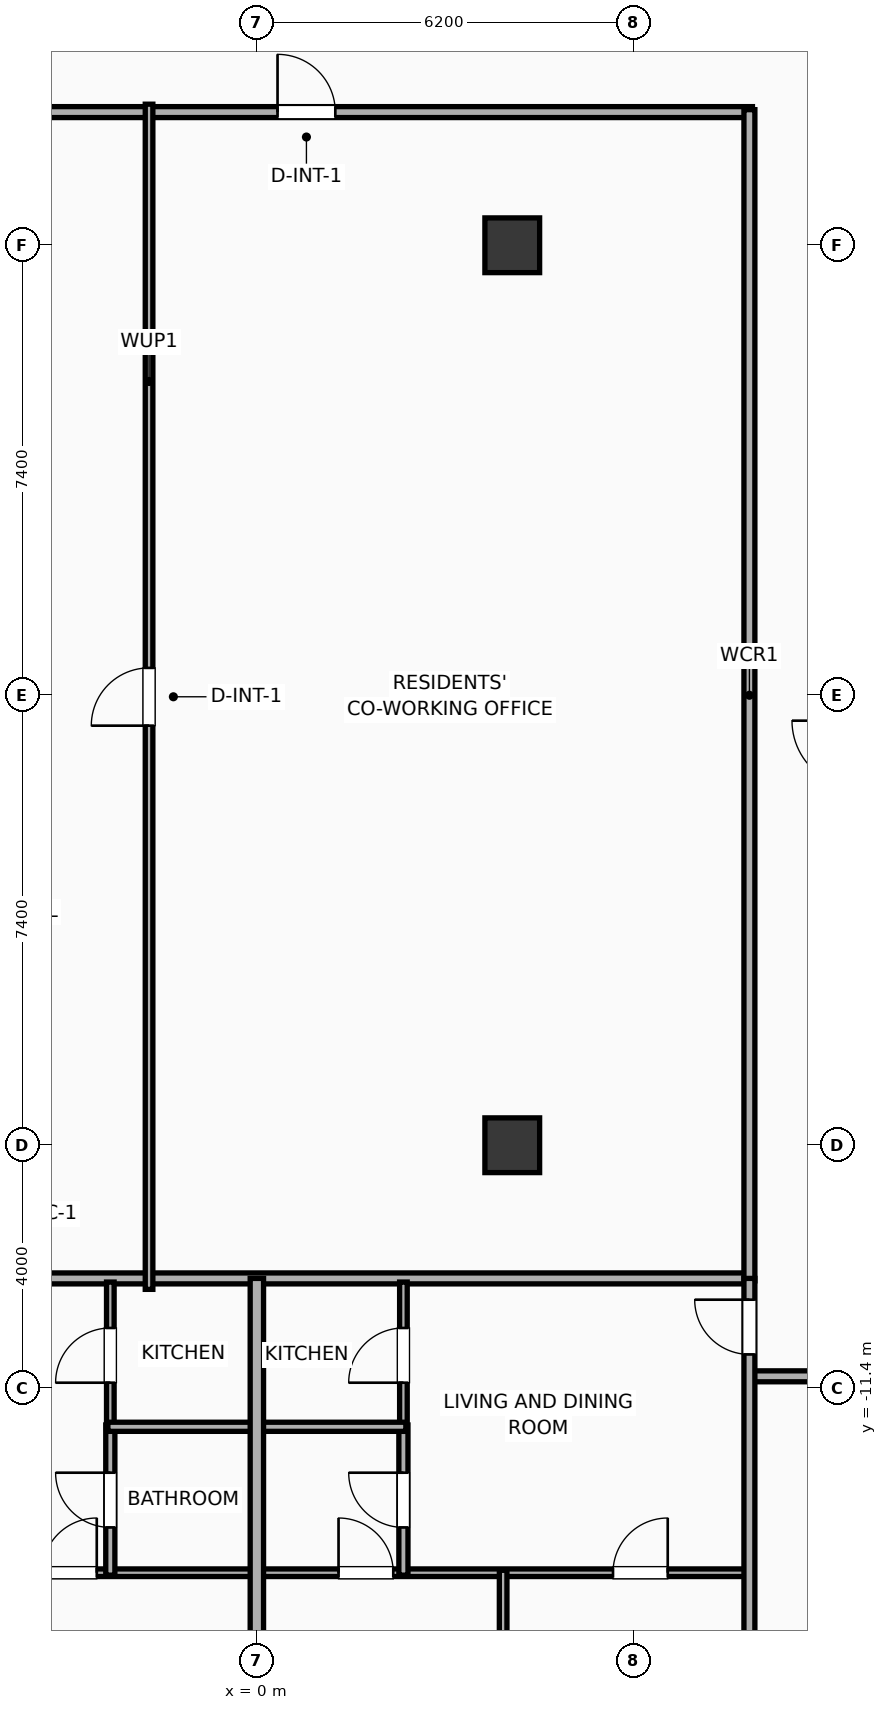
"""IFC4 building model, lengths in metres.
Left out: names, types, materials, properties, quantities, classifications, styles, units other than length and angle.
Written with IfcOpenShell. Run it as: python <this file> out.ifc"""

import sys

from ifc_helpers import new_model, si_unit, direction, frame, frame_2d, origin, origin_2d, place, context, subcontext, project, spatial, rectangle, extrude, element, fill, save


model = new_model("IFC4")
c1 = context("Model", 3, precision=1e-05, world=origin(), true_north=direction((0.0, 1.0)))
c2 = subcontext(c1, "Body", "Model", "MODEL_VIEW")
j1 = project(units=[si_unit("LENGTHUNIT", "METRE"), si_unit("PLANEANGLEUNIT", "RADIAN")], contexts=[c1])
p1 = place(None, origin())
s1 = spatial("IfcSite", under=j1, at=p1, CompositionType="ELEMENT")
p2 = place(p1, origin())
s2 = spatial("IfcBuilding", under=s1, at=p2, CompositionType="ELEMENT")
p3 = place(p2, frame((0.0, 0.0, 287.3)))
s3 = spatial("IfcBuildingStorey", under=s2, at=p3, CompositionType="ELEMENT", Elevation=287.3)
for number, where, z_axis, x_axis in (
    (1, (4.2, -7.4, 0.0), (0.0, 0.0, 1.0), (1.0, 0.0, 0.0)),
    (2, (4.2, 7.4, 0.0), (0.0, 0.0, 1.0), (1.0, 0.0, 0.0)),
):
    element("IfcColumn", number, at=place(p3, frame(where, z_axis=z_axis, x_axis=x_axis)), inside=s3, PredefinedType="COLUMN", context=c2, shape_type="SweptSolid", body=[
        extrude(rectangle(XDim=0.9, YDim=0.9, at=origin_2d()), origin(), (0.0, 0.0, 1.0), 3.9),
    ])
p4 = place(p3, frame((-8.15, 9.59, 0.0), z_axis=(0.0, 0.0, 1.0), x_axis=(1.0, 0.0, 0.0)))
e3 = element("IfcWall", 3, at=p4, inside=s3, PredefinedType="PARTITIONING", context=c2, shape_type="SweptSolid", body=[
    extrude(rectangle(XDim=16.3, YDim=0.18, at=frame_2d((8.15, 0.0))), origin(), (0.0, 0.0, 1.0), 3.635),
])
p5 = place(p4, frame((8.49, 0.0, 0.0)))
e4 = element("IfcOpeningElement", 4, at=p5, cuts=e3, PredefinedType="OPENING", context=c2, shape_type="SweptSolid", body=[
    extrude(rectangle(XDim=0.95, YDim=2.05, at=frame_2d((0.475, 1.025))), frame((0.0, 0.1, 0.0), z_axis=(0.0, -1.0, 0.0), x_axis=(1.0, 0.0, 0.0)), (0.0, 0.0, 1.0), 0.2),
])
p6 = place(p3, frame((-8.15, -9.59, 0.0), z_axis=(0.0, 0.0, 1.0), x_axis=(1.0, 0.0, 0.0)))
e5 = element("IfcWall", 5, at=p6, inside=s3, PredefinedType="PARTITIONING", context=c2, shape_type="SweptSolid", body=[
    extrude(rectangle(XDim=16.3, YDim=0.18, at=frame_2d((8.15, 0.0))), origin(), (0.0, 0.0, 1.0), 3.635),
])
p7 = place(p3, frame((8.1, -9.63, 0.0), z_axis=(0.0, 0.0, 1.0), x_axis=(0.0, 1.0, 0.0)))
e6 = element("IfcWall", 6, at=p7, inside=s3, PredefinedType="PARTITIONING", context=c2, shape_type="SweptSolid", body=[
    extrude(rectangle(XDim=19.26, YDim=0.18, at=frame_2d((9.63, 0.0))), origin(), (0.0, 0.0, 1.0), 3.635),
])
p8 = place(p3, frame((-1.773, -9.77, 0.0), z_axis=(0.0, 0.0, 1.0), x_axis=(0.0, 1.0, 0.0)))
e7 = element("IfcWall", 7, at=p8, inside=s3, PredefinedType="PARTITIONING", context=c2, shape_type="SweptSolid", body=[
    extrude(rectangle(XDim=19.49, YDim=0.125, at=frame_2d((9.745, 0.0))), origin(), (0.0, 0.0, 1.0), 3.635),
])
p9 = place(p8, frame((9.27, 0.0, 0.0)))
e8 = element("IfcOpeningElement", 8, at=p9, cuts=e7, PredefinedType="OPENING", context=c2, shape_type="SweptSolid", body=[
    extrude(rectangle(XDim=0.95, YDim=2.05, at=frame_2d((0.475, 1.025))), frame((0.0, 0.073, 0.0), z_axis=(0.0, -1.0, 0.0), x_axis=(1.0, 0.0, 0.0)), (0.0, 0.0, 1.0), 0.145),
])
p10 = place(p3, frame((8.08, -11.2, 0.0), z_axis=(0.0, 0.0, 1.0), x_axis=(1.0, 0.0, 0.0)))
e9 = element("IfcWall", 9, at=p10, inside=s3, PredefinedType="PARTITIONING", context=c2, shape_type="SweptSolid", body=[
    extrude(rectangle(XDim=15.121, YDim=0.18, at=frame_2d((7.56, 0.0))), origin(), (0.0, 0.0, 1.0), 3.635),
])
p11 = place(p10, frame((1.932, 0.0, 0.0)))
e10 = element("IfcOpeningElement", 10, at=p11, cuts=e9, PredefinedType="OPENING", context=c2, shape_type="SweptSolid", body=[
    extrude(rectangle(XDim=1.15, YDim=2.05, at=frame_2d((0.575, 1.025))), frame((0.0, 0.1, 0.0), z_axis=(0.0, -1.0, 0.0), x_axis=(1.0, 0.0, 0.0)), (0.0, 0.0, 1.0), 0.2),
])
p12 = place(p10, frame((11.075, 0.0, 0.0)))
e11 = element("IfcOpeningElement", 11, at=p12, cuts=e9, PredefinedType="OPENING", context=c2, shape_type="SweptSolid", body=[
    extrude(rectangle(XDim=0.9, YDim=2.05, at=frame_2d((0.45, 1.025))), frame((0.0, 0.1, 0.0), z_axis=(0.0, -1.0, 0.0), x_axis=(1.0, 0.0, 0.0)), (0.0, 0.0, 1.0), 0.2),
])
p13 = place(p3, frame((-8.08, -14.43, 0.0), z_axis=(0.0, 0.0, 1.0), x_axis=(1.0, 0.0, 0.0)))
e12 = element("IfcWall", 12, at=p13, inside=s3, PredefinedType="PARTITIONING", context=c2, shape_type="SweptSolid", body=[
    extrude(rectangle(XDim=8.06, YDim=0.125, at=frame_2d((4.03, 0.0))), origin(), (0.0, 0.0, 1.0), 3.635),
])
p14 = place(p13, frame((1.323, 0.0, 0.0)))
e13 = element("IfcOpeningElement", 13, at=p14, cuts=e12, PredefinedType="OPENING", context=c2, shape_type="SweptSolid", body=[
    extrude(rectangle(XDim=0.9, YDim=2.05, at=frame_2d((0.45, 1.025))), frame((0.0, 0.073, 0.0), z_axis=(0.0, -1.0, 0.0), x_axis=(1.0, 0.0, 0.0)), (0.0, 0.0, 1.0), 0.145),
])
p15 = place(p13, frame((4.547, 0.0, 0.0)))
e14 = element("IfcOpeningElement", 14, at=p15, cuts=e12, PredefinedType="OPENING", context=c2, shape_type="SweptSolid", body=[
    extrude(rectangle(XDim=0.9, YDim=2.05, at=frame_2d((0.45, 1.025))), frame((0.0, 0.073, 0.0), z_axis=(0.0, -1.0, 0.0), x_axis=(1.0, 0.0, 0.0)), (0.0, 0.0, 1.0), 0.145),
])
p16 = place(p3, frame((-2.41, -12.06, 0.0), z_axis=(0.0, 0.0, 1.0), x_axis=(0.0, 1.0, 0.0)))
e15 = element("IfcWall", 15, at=p16, inside=s3, PredefinedType="PARTITIONING", context=c2, shape_type="SweptSolid", body=[
    extrude(rectangle(XDim=2.41, YDim=0.125, at=frame_2d((1.205, 0.0))), origin(), (0.0, 0.0, 1.0), 3.635),
])
p17 = place(p16, frame((0.755, 0.0, 0.0)))
e16 = element("IfcOpeningElement", 16, at=p17, cuts=e15, PredefinedType="OPENING", context=c2, shape_type="SweptSolid", body=[
    extrude(rectangle(XDim=0.9, YDim=2.05, at=frame_2d((0.45, 1.025))), frame((0.0, 0.073, 0.0), z_axis=(0.0, -1.0, 0.0), x_axis=(1.0, 0.0, 0.0)), (0.0, 0.0, 1.0), 0.145),
])
p18 = place(p3, frame((-2.41, -14.47, 0.0), z_axis=(0.0, 0.0, 1.0), x_axis=(0.0, 1.0, 0.0)))
e17 = element("IfcWall", 17, at=p18, inside=s3, PredefinedType="PLUMBINGWALL", context=c2, shape_type="SweptSolid", body=[
    extrude(rectangle(XDim=2.47, YDim=0.15, at=frame_2d((1.235, 0.0))), origin(), (0.0, 0.0, 1.0), 3.635),
])
p19 = place(p18, frame((0.785, 0.0, 0.0)))
e18 = element("IfcOpeningElement", 18, at=p19, cuts=e17, PredefinedType="OPENING", context=c2, shape_type="SweptSolid", body=[
    extrude(rectangle(XDim=0.9, YDim=2.05, at=frame_2d((0.45, 1.025))), frame((0.0, 0.085, 0.0), z_axis=(0.0, -1.0, 0.0), x_axis=(1.0, 0.0, 0.0)), (0.0, 0.0, 1.0), 0.17),
])
p20 = place(p3, frame((-2.45, -12.03, 0.0), z_axis=(0.0, 0.0, 1.0), x_axis=(1.0, 0.0, 0.0)))
e19 = element("IfcWall", 19, at=p20, inside=s3, PredefinedType="PLUMBINGWALL", context=c2, shape_type="SweptSolid", body=[
    extrude(rectangle(XDim=2.43, YDim=0.15, at=frame_2d((1.215, 0.0))), origin(), (0.0, 0.0, 1.0), 3.635),
])
p21 = place(p3, frame((0.02, -14.43, 0.0), z_axis=(0.0, 0.0, 1.0), x_axis=(1.0, 0.0, 0.0)))
e20 = element("IfcWall", 20, at=p21, inside=s3, PredefinedType="PARTITIONING", context=c2, shape_type="SweptSolid", body=[
    extrude(rectangle(XDim=8.06, YDim=0.125, at=frame_2d((4.03, 0.0))), origin(), (0.0, 0.0, 1.0), 3.635),
])
p22 = place(p21, frame((1.323, 0.0, 0.0)))
e21 = element("IfcOpeningElement", 21, at=p22, cuts=e20, PredefinedType="OPENING", context=c2, shape_type="SweptSolid", body=[
    extrude(rectangle(XDim=0.9, YDim=2.05, at=frame_2d((0.45, 1.025))), frame((0.0, 0.073, 0.0), z_axis=(0.0, -1.0, 0.0), x_axis=(1.0, 0.0, 0.0)), (0.0, 0.0, 1.0), 0.145),
])
p23 = place(p21, frame((5.837, 0.0, 0.0)))
e22 = element("IfcOpeningElement", 22, at=p23, cuts=e20, PredefinedType="OPENING", context=c2, shape_type="SweptSolid", body=[
    extrude(rectangle(XDim=0.9, YDim=2.05, at=frame_2d((0.45, 1.025))), frame((0.0, 0.073, 0.0), z_axis=(0.0, -1.0, 0.0), x_axis=(1.0, 0.0, 0.0)), (0.0, 0.0, 1.0), 0.145),
])
p24 = place(p3, frame((2.41, -12.06, 0.0), z_axis=(0.0, 0.0, 1.0), x_axis=(0.0, 1.0, 0.0)))
e23 = element("IfcWall", 23, at=p24, inside=s3, PredefinedType="PARTITIONING", context=c2, shape_type="SweptSolid", body=[
    extrude(rectangle(XDim=2.41, YDim=0.125, at=frame_2d((1.205, 0.0))), origin(), (0.0, 0.0, 1.0), 3.075),
])
p25 = place(p24, frame((0.755, 0.0, 0.0)))
e24 = element("IfcOpeningElement", 24, at=p25, cuts=e23, PredefinedType="OPENING", context=c2, shape_type="SweptSolid", body=[
    extrude(rectangle(XDim=0.9, YDim=2.05, at=frame_2d((0.45, 1.025))), frame((0.0, 0.073, 0.0), z_axis=(0.0, -1.0, 0.0), x_axis=(1.0, 0.0, 0.0)), (0.0, 0.0, 1.0), 0.145),
])
p26 = place(p3, frame((2.41, -14.47, 0.0), z_axis=(0.0, 0.0, 1.0), x_axis=(0.0, 1.0, 0.0)))
e25 = element("IfcWall", 25, at=p26, inside=s3, PredefinedType="PLUMBINGWALL", context=c2, shape_type="SweptSolid", body=[
    extrude(rectangle(XDim=2.47, YDim=0.15, at=frame_2d((1.235, 0.0))), origin(), (0.0, 0.0, 1.0), 3.075),
])
p27 = place(p26, frame((0.785, 0.0, 0.0)))
e26 = element("IfcOpeningElement", 26, at=p27, cuts=e25, PredefinedType="OPENING", context=c2, shape_type="SweptSolid", body=[
    extrude(rectangle(XDim=0.9, YDim=2.05, at=frame_2d((0.45, 1.025))), frame((0.0, 0.085, 0.0), z_axis=(0.0, -1.0, 0.0), x_axis=(1.0, 0.0, 0.0)), (0.0, 0.0, 1.0), 0.17),
])
p28 = place(p3, frame((0.02, -12.03, 0.0), z_axis=(0.0, 0.0, 1.0), x_axis=(1.0, 0.0, 0.0)))
e27 = element("IfcWall", 27, at=p28, inside=s3, PredefinedType="PLUMBINGWALL", context=c2, shape_type="SweptSolid", body=[
    extrude(rectangle(XDim=2.43, YDim=0.15, at=frame_2d((1.215, 0.0))), origin(), (0.0, 0.0, 1.0), 3.635),
])
p29 = place(p3, frame((4.05, -19.432, 0.0), z_axis=(0.0, 0.0, 1.0), x_axis=(0.0, 1.0, 0.0)))
e28 = element("IfcWall", 28, at=p29, inside=s3, PredefinedType="PARTITIONING", context=c2, shape_type="SweptSolid", body=[
    extrude(rectangle(XDim=5.042, YDim=0.125, at=frame_2d((2.521, 0.0))), origin(), (0.0, 0.0, 1.0), 3.635),
])
p30 = place(p3, frame((8.1, -19.857, 0.0), z_axis=(0.0, 0.0, 1.0), x_axis=(0.0, 1.0, 0.0)))
e29 = element("IfcWall", 29, at=p30, inside=s3, PredefinedType="PARTITIONING", context=c2, shape_type="SweptSolid", body=[
    extrude(rectangle(XDim=10.267, YDim=0.18, at=frame_2d((5.134, 0.0))), origin(), (0.0, 0.0, 1.0), 3.635),
])
p31 = place(p30, frame((9.017, 0.0, 0.0)))
e30 = element("IfcOpeningElement", 30, at=p31, cuts=e29, PredefinedType="OPENING", context=c2, shape_type="SweptSolid", body=[
    extrude(rectangle(XDim=0.9, YDim=2.05, at=frame_2d((0.45, 1.025))), frame((0.0, 0.1, 0.0), z_axis=(0.0, -1.0, 0.0), x_axis=(1.0, 0.0, 0.0)), (0.0, 0.0, 1.0), 0.2),
])
p32 = place(p3, frame((0.0, -19.006, 0.0), z_axis=(0.0, 0.0, 1.0), x_axis=(0.0, 1.0, 0.0)))
e31 = element("IfcWall", 31, at=p32, inside=s3, PredefinedType="PARTITIONING", context=c2, shape_type="SweptSolid", body=[
    extrude(rectangle(XDim=9.416, YDim=0.22, at=frame_2d((4.708, 0.0))), origin(), (0.0, 0.0, 1.0), 3.635),
])
p33 = place(p5, origin())
e32 = element("IfcDoor", 32, at=p33, inside=s3, OperationType="SINGLE_SWING_LEFT", PredefinedType="DOOR", context=c2, shape_type="SweptSolid", body=[
    extrude(rectangle(XDim=0.95, YDim=2.05, at=frame_2d((0.475, 1.025))), frame((0.0, 0.025, 0.0), z_axis=(0.0, -1.0, 0.0), x_axis=(1.0, 0.0, 0.0)), (0.0, 0.0, 1.0), 0.05),
])
fill(e4, e32)
p34 = place(p9, origin())
e33 = element("IfcDoor", 33, at=p34, inside=s3, OperationType="SINGLE_SWING_LEFT", PredefinedType="DOOR", context=c2, shape_type="SweptSolid", body=[
    extrude(rectangle(XDim=0.95, YDim=2.05, at=frame_2d((0.475, 1.025))), frame((0.0, 0.025, 0.0), z_axis=(0.0, -1.0, 0.0), x_axis=(1.0, 0.0, 0.0)), (0.0, 0.0, 1.0), 0.05),
])
fill(e8, e33)
p35 = place(p15, origin())
e34 = element("IfcDoor", 34, at=p35, inside=s3, OperationType="SINGLE_SWING_RIGHT", PredefinedType="DOOR", context=c2, shape_type="SweptSolid", body=[
    extrude(rectangle(XDim=0.9, YDim=2.05, at=frame_2d((0.45, 1.025))), frame((0.0, 0.025, 0.0), z_axis=(0.0, -1.0, 0.0), x_axis=(1.0, 0.0, 0.0)), (0.0, 0.0, 1.0), 0.05),
])
fill(e14, e34)
p36 = place(p17, origin())
e35 = element("IfcDoor", 35, at=p36, inside=s3, OperationType="SINGLE_SWING_LEFT", PredefinedType="DOOR", context=c2, shape_type="SweptSolid", body=[
    extrude(rectangle(XDim=0.9, YDim=2.05, at=frame_2d((0.45, 1.025))), frame((0.0, 0.025, 0.0), z_axis=(0.0, -1.0, 0.0), x_axis=(1.0, 0.0, 0.0)), (0.0, 0.0, 1.0), 0.05),
])
fill(e16, e35)
p37 = place(p19, origin())
e36 = element("IfcDoor", 36, at=p37, inside=s3, OperationType="SINGLE_SWING_RIGHT", PredefinedType="DOOR", context=c2, shape_type="SweptSolid", body=[
    extrude(rectangle(XDim=0.9, YDim=2.05, at=frame_2d((0.45, 1.025))), frame((0.0, 0.025, 0.0), z_axis=(0.0, -1.0, 0.0), x_axis=(1.0, 0.0, 0.0)), (0.0, 0.0, 1.0), 0.05),
])
fill(e18, e36)
p38 = place(p22, origin())
e37 = element("IfcDoor", 37, at=p38, inside=s3, OperationType="SINGLE_SWING_LEFT", PredefinedType="DOOR", context=c2, shape_type="SweptSolid", body=[
    extrude(rectangle(XDim=0.9, YDim=2.05, at=frame_2d((0.45, 1.025))), frame((0.0, 0.025, 0.0), z_axis=(0.0, -1.0, 0.0), x_axis=(1.0, 0.0, 0.0)), (0.0, 0.0, 1.0), 0.05),
])
fill(e21, e37)
p39 = place(p23, origin())
e38 = element("IfcDoor", 38, at=p39, inside=s3, OperationType="SINGLE_SWING_RIGHT", PredefinedType="DOOR", context=c2, shape_type="SweptSolid", body=[
    extrude(rectangle(XDim=0.9, YDim=2.05, at=frame_2d((0.45, 1.025))), frame((0.0, 0.025, 0.0), z_axis=(0.0, -1.0, 0.0), x_axis=(1.0, 0.0, 0.0)), (0.0, 0.0, 1.0), 0.05),
])
fill(e22, e38)
p40 = place(p25, origin())
e39 = element("IfcDoor", 39, at=p40, inside=s3, OperationType="SINGLE_SWING_LEFT", PredefinedType="DOOR", context=c2, shape_type="SweptSolid", body=[
    extrude(rectangle(XDim=0.9, YDim=2.05, at=frame_2d((0.45, 1.025))), frame((0.0, 0.025, 0.0), z_axis=(0.0, -1.0, 0.0), x_axis=(1.0, 0.0, 0.0)), (0.0, 0.0, 1.0), 0.05),
])
fill(e24, e39)
p41 = place(p27, origin())
e40 = element("IfcDoor", 40, at=p41, inside=s3, OperationType="SINGLE_SWING_RIGHT", PredefinedType="DOOR", context=c2, shape_type="SweptSolid", body=[
    extrude(rectangle(XDim=0.9, YDim=2.05, at=frame_2d((0.45, 1.025))), frame((0.0, 0.025, 0.0), z_axis=(0.0, -1.0, 0.0), x_axis=(1.0, 0.0, 0.0)), (0.0, 0.0, 1.0), 0.05),
])
fill(e26, e40)
p42 = place(p31, origin())
e41 = element("IfcDoor", 41, at=p42, inside=s3, OperationType="SINGLE_SWING_RIGHT", PredefinedType="DOOR", context=c2, shape_type="SweptSolid", body=[
    extrude(rectangle(XDim=0.9, YDim=2.05, at=frame_2d((0.45, 1.025))), frame((0.0, 0.025, 0.0), z_axis=(0.0, -1.0, 0.0), x_axis=(1.0, 0.0, 0.0)), (0.0, 0.0, 1.0), 0.05),
])
fill(e30, e41)
save(model, sys.argv[1])
